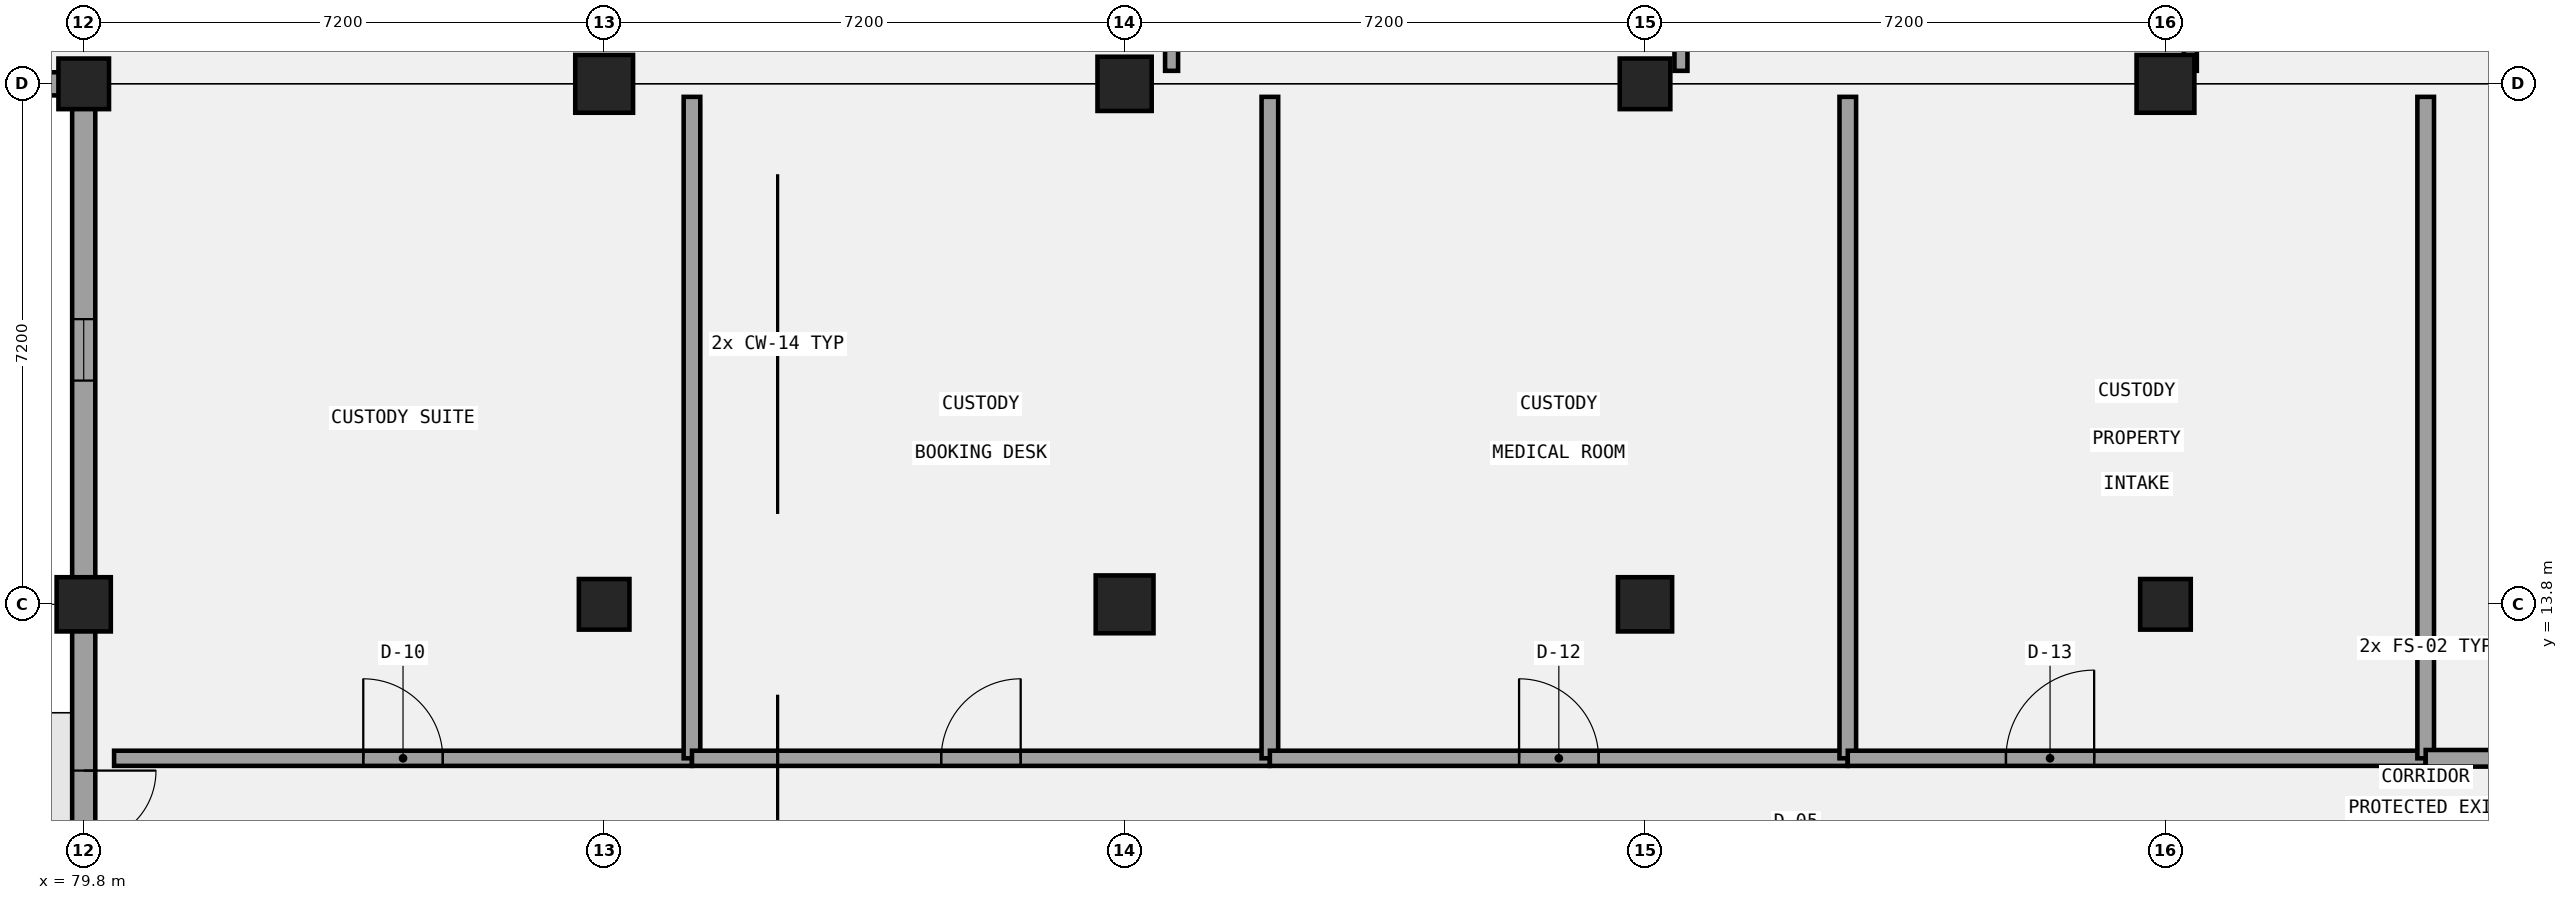
"""IFC4 building model, lengths in metres.
Left out: names, types, materials, properties, quantities, classifications, styles, units other than length and angle.
Written with IfcOpenShell. Run it as: python <this file> out.ifc"""

import sys

from ifc_helpers import new_model, si_unit, direction, frame, frame_2d, origin, origin_2d, place, context, subcontext, project, spatial, rectangle, extrude, element, fill, save


model = new_model("IFC4")
c1 = context("Model", 3, precision=1e-05, world=origin(), true_north=direction((0.0, 1.0)))
c2 = subcontext(c1, "Body", "Model", "MODEL_VIEW")
j1 = project(units=[si_unit("LENGTHUNIT", "METRE"), si_unit("PLANEANGLEUNIT", "RADIAN")], contexts=[c1])
p1 = place(None, origin())
s1 = spatial("IfcSite", under=j1, at=p1, CompositionType="ELEMENT")
p2 = place(p1, origin())
s2 = spatial("IfcBuilding", under=s1, at=p2, CompositionType="ELEMENT")
p3 = place(p2, origin())
s3 = spatial("IfcBuildingStorey", under=s2, at=p3, CompositionType="ELEMENT", Elevation=0.0)
p4 = place(p3, frame((79.8, 13.8, -0.32), z_axis=(0.0, 0.0, 1.0), x_axis=(1.0, 0.0, 0.0)))
e1 = element("IfcColumn", 1, at=p4, inside=s3, PredefinedType="COLUMN", context=c2, shape_type="SweptSolid", body=[
    extrude(rectangle(XDim=0.75, YDim=0.75, at=origin_2d()), origin(), (0.0, 0.0, 1.0), 5.72),
])
p5 = place(p3, frame((79.8, 21.0, 0.0), z_axis=(0.0, 0.0, 1.0), x_axis=(1.0, 0.0, 0.0)))
e2 = element("IfcColumn", 2, at=p5, inside=s3, PredefinedType="COLUMN", context=c2, shape_type="SweptSolid", body=[
    extrude(rectangle(XDim=0.7, YDim=0.7, at=origin_2d()), origin(), (0.0, 0.0, 1.0), 5.4),
])
p6 = place(p3, frame((87.0, 13.8, -0.32), z_axis=(0.0, 0.0, 1.0), x_axis=(1.0, 0.0, 0.0)))
e3 = element("IfcColumn", 3, at=p6, inside=s3, PredefinedType="COLUMN", context=c2, shape_type="SweptSolid", body=[
    extrude(rectangle(XDim=0.7, YDim=0.7, at=origin_2d()), origin(), (0.0, 0.0, 1.0), 5.72),
])
p7 = place(p3, frame((87.0, 21.0, 0.0), z_axis=(0.0, 0.0, 1.0), x_axis=(1.0, 0.0, 0.0)))
e4 = element("IfcColumn", 4, at=p7, inside=s3, PredefinedType="COLUMN", context=c2, shape_type="SweptSolid", body=[
    extrude(rectangle(XDim=0.8, YDim=0.8, at=origin_2d()), origin(), (0.0, 0.0, 1.0), 5.4),
])
p8 = place(p3, frame((94.2, 13.8, -0.32), z_axis=(0.0, 0.0, 1.0), x_axis=(1.0, 0.0, 0.0)))
e5 = element("IfcColumn", 5, at=p8, inside=s3, PredefinedType="COLUMN", context=c2, shape_type="SweptSolid", body=[
    extrude(rectangle(XDim=0.8, YDim=0.8, at=origin_2d()), origin(), (0.0, 0.0, 1.0), 5.72),
])
p9 = place(p3, frame((94.2, 21.0, 0.0), z_axis=(0.0, 0.0, 1.0), x_axis=(1.0, 0.0, 0.0)))
e6 = element("IfcColumn", 6, at=p9, inside=s3, PredefinedType="COLUMN", context=c2, shape_type="SweptSolid", body=[
    extrude(rectangle(XDim=0.75, YDim=0.75, at=origin_2d()), origin(), (0.0, 0.0, 1.0), 5.4),
])
p10 = place(p3, frame((101.4, 13.8, -0.32), z_axis=(0.0, 0.0, 1.0), x_axis=(1.0, 0.0, 0.0)))
e7 = element("IfcColumn", 7, at=p10, inside=s3, PredefinedType="COLUMN", context=c2, shape_type="SweptSolid", body=[
    extrude(rectangle(XDim=0.75, YDim=0.75, at=origin_2d()), origin(), (0.0, 0.0, 1.0), 5.72),
])
p11 = place(p3, frame((101.4, 21.0, 0.0), z_axis=(0.0, 0.0, 1.0), x_axis=(1.0, 0.0, 0.0)))
e8 = element("IfcColumn", 8, at=p11, inside=s3, PredefinedType="COLUMN", context=c2, shape_type="SweptSolid", body=[
    extrude(rectangle(XDim=0.7, YDim=0.7, at=origin_2d()), origin(), (0.0, 0.0, 1.0), 5.4),
])
p12 = place(p3, frame((108.6, 13.8, -0.32), z_axis=(0.0, 0.0, 1.0), x_axis=(1.0, 0.0, 0.0)))
e9 = element("IfcColumn", 9, at=p12, inside=s3, PredefinedType="COLUMN", context=c2, shape_type="SweptSolid", body=[
    extrude(rectangle(XDim=0.7, YDim=0.7, at=origin_2d()), origin(), (0.0, 0.0, 1.0), 5.72),
])
p13 = place(p3, frame((108.6, 21.0, 0.0), z_axis=(0.0, 0.0, 1.0), x_axis=(1.0, 0.0, 0.0)))
e10 = element("IfcColumn", 10, at=p13, inside=s3, PredefinedType="COLUMN", context=c2, shape_type="SweptSolid", body=[
    extrude(rectangle(XDim=0.8, YDim=0.8, at=origin_2d()), origin(), (0.0, 0.0, 1.0), 5.4),
])
p14 = place(p3, frame((79.8, 20.84, 0.0), z_axis=(0.0, 0.0, 1.0), x_axis=(0.0, -1.0, 0.0)))
e11 = element("IfcWall", 11, at=p14, inside=s3, PredefinedType="SOLIDWALL", context=c2, shape_type="SweptSolid", body=[
    extrude(rectangle(XDim=20.68, YDim=0.32, at=frame_2d((10.34, 0.0))), origin(), (0.0, 0.0, 1.0), 4.12),
])
p15 = place(p14, frame((9.34, 0.0, 0.0)))
e12 = element("IfcOpeningElement", 12, at=p15, cuts=e11, PredefinedType="OPENING", context=c2, shape_type="SweptSolid", body=[
    extrude(rectangle(XDim=2.0, YDim=2.6, at=frame_2d((1.0, 1.3))), frame((0.0, 0.17, 0.0), z_axis=(0.0, -1.0, 0.0), x_axis=(1.0, 0.0, 0.0)), (0.0, 0.0, 1.0), 0.34),
])
p16 = place(p14, frame((17.035, 0.0, 1.0)))
e13 = element("IfcOpeningElement", 13, at=p16, cuts=e11, PredefinedType="OPENING", context=c2, shape_type="SweptSolid", body=[
    extrude(rectangle(XDim=0.85, YDim=1.4, at=frame_2d((0.425, 0.7))), frame((0.0, 0.17, 0.0), z_axis=(0.0, -1.0, 0.0), x_axis=(1.0, 0.0, 0.0)), (0.0, 0.0, 1.0), 0.34),
])
p17 = place(p14, frame((3.095, 0.0, 1.0)))
e14 = element("IfcOpeningElement", 14, at=p17, cuts=e11, PredefinedType="OPENING", context=c2, shape_type="SweptSolid", body=[
    extrude(rectangle(XDim=0.85, YDim=1.4, at=frame_2d((0.425, 0.7))), frame((0.0, 0.17, 0.0), z_axis=(0.0, -1.0, 0.0), x_axis=(1.0, 0.0, 0.0)), (0.0, 0.0, 1.0), 0.34),
])
p18 = place(p3, frame((29.24, 21.0, 0.0), z_axis=(0.0, 0.0, 1.0), x_axis=(1.0, 0.0, 0.0)))
e15 = element("IfcWall", 15, at=p18, inside=s3, PredefinedType="SOLIDWALL", context=c2, shape_type="SweptSolid", body=[
    extrude(rectangle(XDim=50.72, YDim=0.32, at=frame_2d((25.36, 0.0))), origin(), (0.0, 0.0, 1.0), 3.35),
])
p19 = place(p18, frame((24.36, 0.0, 0.0)))
e16 = element("IfcOpeningElement", 16, at=p19, cuts=e15, PredefinedType="OPENING", context=c2, shape_type="SweptSolid", body=[
    extrude(rectangle(XDim=2.0, YDim=2.6, at=frame_2d((1.0, 1.3))), frame((0.0, 0.17, 0.0), z_axis=(0.0, -1.0, 0.0), x_axis=(1.0, 0.0, 0.0)), (0.0, 0.0, 1.0), 0.34),
])
p20 = place(p18, frame((3.035, 0.0, 1.0)))
e17 = element("IfcOpeningElement", 17, at=p20, cuts=e15, PredefinedType="OPENING", context=c2, shape_type="SweptSolid", body=[
    extrude(rectangle(XDim=1.45, YDim=1.65, at=frame_2d((0.725, 0.825))), frame((0.0, 0.17, 0.0), z_axis=(0.0, -1.0, 0.0), x_axis=(1.0, 0.0, 0.0)), (0.0, 0.0, 1.0), 0.34),
])
p21 = place(p18, frame((10.235, 0.0, 1.0)))
e18 = element("IfcOpeningElement", 18, at=p21, cuts=e15, PredefinedType="OPENING", context=c2, shape_type="SweptSolid", body=[
    extrude(rectangle(XDim=1.45, YDim=1.65, at=frame_2d((0.725, 0.825))), frame((0.0, 0.17, 0.0), z_axis=(0.0, -1.0, 0.0), x_axis=(1.0, 0.0, 0.0)), (0.0, 0.0, 1.0), 0.34),
])
p22 = place(p18, frame((17.435, 0.0, 1.0)))
e19 = element("IfcOpeningElement", 19, at=p22, cuts=e15, PredefinedType="OPENING", context=c2, shape_type="SweptSolid", body=[
    extrude(rectangle(XDim=1.45, YDim=1.65, at=frame_2d((0.725, 0.825))), frame((0.0, 0.17, 0.0), z_axis=(0.0, -1.0, 0.0), x_axis=(1.0, 0.0, 0.0)), (0.0, 0.0, 1.0), 0.34),
])
p23 = place(p18, frame((31.835, 0.0, 1.0)))
e20 = element("IfcOpeningElement", 20, at=p23, cuts=e15, PredefinedType="OPENING", context=c2, shape_type="SweptSolid", body=[
    extrude(rectangle(XDim=1.45, YDim=1.65, at=frame_2d((0.725, 0.825))), frame((0.0, 0.17, 0.0), z_axis=(0.0, -1.0, 0.0), x_axis=(1.0, 0.0, 0.0)), (0.0, 0.0, 1.0), 0.34),
])
p24 = place(p18, frame((39.035, 0.0, 1.0)))
e21 = element("IfcOpeningElement", 21, at=p24, cuts=e15, PredefinedType="OPENING", context=c2, shape_type="SweptSolid", body=[
    extrude(rectangle(XDim=1.45, YDim=1.65, at=frame_2d((0.725, 0.825))), frame((0.0, 0.17, 0.0), z_axis=(0.0, -1.0, 0.0), x_axis=(1.0, 0.0, 0.0)), (0.0, 0.0, 1.0), 0.34),
])
p25 = place(p18, frame((46.235, 0.0, 1.0)))
e22 = element("IfcOpeningElement", 22, at=p25, cuts=e15, PredefinedType="OPENING", context=c2, shape_type="SweptSolid", body=[
    extrude(rectangle(XDim=1.45, YDim=1.65, at=frame_2d((0.725, 0.825))), frame((0.0, 0.17, 0.0), z_axis=(0.0, -1.0, 0.0), x_axis=(1.0, 0.0, 0.0)), (0.0, 0.0, 1.0), 0.34),
])
for number, where, z_axis, x_axis in (
    (23, (94.85, 21.18, 0.0), (0.0, 0.0, 1.0), (0.0, 1.0, 0.0)),
    (24, (101.897, 21.18, 0.0), (0.0, 0.0, 1.0), (0.0, 1.0, 0.0)),
):
    element("IfcWall", number, at=place(p3, frame(where, z_axis=z_axis, x_axis=x_axis)), inside=s3, PredefinedType="PARTITIONING", context=c2, shape_type="SweptSolid", body=[
        extrude(rectangle(XDim=7.97, YDim=0.18, at=frame_2d((3.985, 0.0))), origin(), (0.0, 0.0, 1.0), 5.12),
    ])
p26 = place(p3, frame((108.944, 21.18, 0.0), z_axis=(0.0, 0.0, 1.0), x_axis=(0.0, 1.0, 0.0)))
e25 = element("IfcWall", 25, at=p26, inside=s3, PredefinedType="PARTITIONING", context=c2, shape_type="SweptSolid", body=[
    extrude(rectangle(XDim=7.97, YDim=0.18, at=frame_2d((3.985, 0.0))), origin(), (0.0, 0.0, 1.0), 4.27),
])
p27 = place(p3, frame((80.22, 11.67, 0.0), z_axis=(0.0, 0.0, 1.0), x_axis=(1.0, 0.0, 0.0)))
e26 = element("IfcWall", 26, at=p27, inside=s3, PredefinedType="PARTITIONING", context=c2, shape_type="SweptSolid", body=[
    extrude(rectangle(XDim=7.995, YDim=0.21, at=frame_2d((3.998, 0.0))), origin(), (0.0, 0.0, 1.0), 5.12),
])
p28 = place(p27, frame((3.448, 0.0, 0.0)))
e27 = element("IfcOpeningElement", 27, at=p28, cuts=e26, PredefinedType="OPENING", context=c2, shape_type="SweptSolid", body=[
    extrude(rectangle(XDim=1.1, YDim=2.1, at=frame_2d((0.55, 1.05))), frame((0.0, 0.115, 0.0), z_axis=(0.0, -1.0, 0.0), x_axis=(1.0, 0.0, 0.0)), (0.0, 0.0, 1.0), 0.23),
])
p29 = place(p3, frame((88.215, 11.67, 0.0), z_axis=(0.0, 0.0, 1.0), x_axis=(0.0, 1.0, 0.0)))
e28 = element("IfcWall", 28, at=p29, inside=s3, PredefinedType="PARTITIONING", context=c2, shape_type="SweptSolid", body=[
    extrude(rectangle(XDim=9.15, YDim=0.23, at=frame_2d((4.575, 0.0))), origin(), (0.0, 0.0, 1.0), 5.12),
])
p30 = place(p3, frame((88.215, 11.67, 0.0), z_axis=(0.0, 0.0, 1.0), x_axis=(1.0, 0.0, 0.0)))
e29 = element("IfcWall", 29, at=p30, inside=s3, PredefinedType="PARTITIONING", context=c2, shape_type="SweptSolid", body=[
    extrude(rectangle(XDim=7.995, YDim=0.21, at=frame_2d((3.998, 0.0))), origin(), (0.0, 0.0, 1.0), 5.12),
])
p31 = place(p30, frame((3.448, 0.0, 0.0)))
e30 = element("IfcOpeningElement", 30, at=p31, cuts=e29, PredefinedType="OPENING", context=c2, shape_type="SweptSolid", body=[
    extrude(rectangle(XDim=1.1, YDim=2.22, at=frame_2d((0.55, 1.11))), frame((0.0, 0.115, 0.0), z_axis=(0.0, -1.0, 0.0), x_axis=(1.0, 0.0, 0.0)), (0.0, 0.0, 1.0), 0.23),
])
p32 = place(p3, frame((96.21, 11.67, 0.0), z_axis=(0.0, 0.0, 1.0), x_axis=(0.0, 1.0, 0.0)))
e31 = element("IfcWall", 31, at=p32, inside=s3, PredefinedType="PARTITIONING", context=c2, shape_type="SweptSolid", body=[
    extrude(rectangle(XDim=9.15, YDim=0.23, at=frame_2d((4.575, 0.0))), origin(), (0.0, 0.0, 1.0), 5.12),
])
p33 = place(p3, frame((96.21, 11.67, 0.0), z_axis=(0.0, 0.0, 1.0), x_axis=(1.0, 0.0, 0.0)))
e32 = element("IfcWall", 32, at=p33, inside=s3, PredefinedType="PARTITIONING", context=c2, shape_type="SweptSolid", body=[
    extrude(rectangle(XDim=7.995, YDim=0.21, at=frame_2d((3.998, 0.0))), origin(), (0.0, 0.0, 1.0), 5.12),
])
p34 = place(p33, frame((3.448, 0.0, 0.0)))
e33 = element("IfcOpeningElement", 33, at=p34, cuts=e32, PredefinedType="OPENING", context=c2, shape_type="SweptSolid", body=[
    extrude(rectangle(XDim=1.1, YDim=2.35, at=frame_2d((0.55, 1.175))), frame((0.0, 0.115, 0.0), z_axis=(0.0, -1.0, 0.0), x_axis=(1.0, 0.0, 0.0)), (0.0, 0.0, 1.0), 0.23),
])
p35 = place(p3, frame((104.205, 11.67, 0.0), z_axis=(0.0, 0.0, 1.0), x_axis=(0.0, 1.0, 0.0)))
e34 = element("IfcWall", 34, at=p35, inside=s3, PredefinedType="PARTITIONING", context=c2, shape_type="SweptSolid", body=[
    extrude(rectangle(XDim=9.15, YDim=0.23, at=frame_2d((4.575, 0.0))), origin(), (0.0, 0.0, 1.0), 5.12),
])
p36 = place(p3, frame((104.205, 11.67, 0.0), z_axis=(0.0, 0.0, 1.0), x_axis=(1.0, 0.0, 0.0)))
e35 = element("IfcWall", 35, at=p36, inside=s3, PredefinedType="PARTITIONING", context=c2, shape_type="SweptSolid", body=[
    extrude(rectangle(XDim=7.995, YDim=0.21, at=frame_2d((3.998, 0.0))), origin(), (0.0, 0.0, 1.0), 5.12),
])
p37 = place(p36, frame((2.188, 0.0, 0.0)))
e36 = element("IfcOpeningElement", 36, at=p37, cuts=e35, PredefinedType="OPENING", context=c2, shape_type="SweptSolid", body=[
    extrude(rectangle(XDim=1.22, YDim=2.1, at=frame_2d((0.61, 1.05))), frame((0.0, 0.115, 0.0), z_axis=(0.0, -1.0, 0.0), x_axis=(1.0, 0.0, 0.0)), (0.0, 0.0, 1.0), 0.23),
])
p38 = place(p3, frame((112.2, 11.67, 0.0), z_axis=(0.0, 0.0, 1.0), x_axis=(0.0, 1.0, 0.0)))
e37 = element("IfcWall", 37, at=p38, inside=s3, PredefinedType="PARTITIONING", context=c2, shape_type="SweptSolid", body=[
    extrude(rectangle(XDim=9.15, YDim=0.23, at=frame_2d((4.575, 0.0))), origin(), (0.0, 0.0, 1.0), 5.12),
])
p39 = place(p3, frame((112.2, 11.67, 0.0), z_axis=(0.0, 0.0, 1.0), x_axis=(1.0, 0.0, 0.0)))
e38 = element("IfcWall", 38, at=p39, inside=s3, PredefinedType="PARTITIONING", context=c2, shape_type="SweptSolid", body=[
    extrude(rectangle(XDim=7.995, YDim=0.23, at=frame_2d((3.998, 0.0))), origin(), (0.0, 0.0, 1.0), 5.12),
])
p40 = place(p39, frame((4.587, 0.0, 0.0)))
e39 = element("IfcOpeningElement", 39, at=p40, cuts=e38, PredefinedType="OPENING", context=c2, shape_type="SweptSolid", body=[
    extrude(rectangle(XDim=1.22, YDim=2.22, at=frame_2d((0.61, 1.11))), frame((0.0, 0.125, 0.0), z_axis=(0.0, -1.0, 0.0), x_axis=(1.0, 0.0, 0.0)), (0.0, 0.0, 1.0), 0.25),
])
p41 = place(p15, frame((2.0, 0.0, 0.0), z_axis=(0.0, 0.0, 1.0), x_axis=(-1.0, 0.0, 0.0)))
e40 = element("IfcDoor", 40, at=p41, inside=s3, OperationType="DOUBLE_DOOR_SINGLE_SWING", PredefinedType="DOOR", context=c2, shape_type="SweptSolid", body=[
    extrude(rectangle(XDim=2.0, YDim=2.6, at=frame_2d((1.0, 1.3))), frame((0.0, 0.025, 0.0), z_axis=(0.0, -1.0, 0.0), x_axis=(1.0, 0.0, 0.0)), (0.0, 0.0, 1.0), 0.05),
])
fill(e12, e40)
p42 = place(p17, origin())
e41 = element("IfcWindow", 41, at=p42, inside=s3, PartitioningType="SINGLE_PANEL", PredefinedType="WINDOW", context=c2, shape_type="SweptSolid", body=[
    extrude(rectangle(XDim=0.85, YDim=1.4, at=frame_2d((0.425, 0.7))), frame((0.0, 0.03, 0.0), z_axis=(0.0, -1.0, 0.0), x_axis=(1.0, 0.0, 0.0)), (0.0, 0.0, 1.0), 0.06),
])
fill(e14, e41)
p43 = place(p28, origin())
e42 = element("IfcDoor", 42, at=p43, inside=s3, OperationType="SINGLE_SWING_LEFT", PredefinedType="DOOR", context=c2, shape_type="SweptSolid", body=[
    extrude(rectangle(XDim=1.1, YDim=2.1, at=frame_2d((0.55, 1.05))), frame((0.0, 0.025, 0.0), z_axis=(0.0, -1.0, 0.0), x_axis=(1.0, 0.0, 0.0)), (0.0, 0.0, 1.0), 0.05),
])
fill(e27, e42)
p44 = place(p31, origin())
e43 = element("IfcDoor", 43, at=p44, inside=s3, OperationType="SINGLE_SWING_RIGHT", PredefinedType="DOOR", context=c2, shape_type="SweptSolid", body=[
    extrude(rectangle(XDim=1.1, YDim=2.22, at=frame_2d((0.55, 1.11))), frame((0.0, 0.025, 0.0), z_axis=(0.0, -1.0, 0.0), x_axis=(1.0, 0.0, 0.0)), (0.0, 0.0, 1.0), 0.05),
])
fill(e30, e43)
p45 = place(p34, origin())
e44 = element("IfcDoor", 44, at=p45, inside=s3, OperationType="SINGLE_SWING_LEFT", PredefinedType="DOOR", context=c2, shape_type="SweptSolid", body=[
    extrude(rectangle(XDim=1.1, YDim=2.35, at=frame_2d((0.55, 1.175))), frame((0.0, 0.025, 0.0), z_axis=(0.0, -1.0, 0.0), x_axis=(1.0, 0.0, 0.0)), (0.0, 0.0, 1.0), 0.05),
])
fill(e33, e44)
p46 = place(p37, origin())
e45 = element("IfcDoor", 45, at=p46, inside=s3, OperationType="SINGLE_SWING_RIGHT", PredefinedType="DOOR", context=c2, shape_type="SweptSolid", body=[
    extrude(rectangle(XDim=1.22, YDim=2.1, at=frame_2d((0.61, 1.05))), frame((0.0, 0.025, 0.0), z_axis=(0.0, -1.0, 0.0), x_axis=(1.0, 0.0, 0.0)), (0.0, 0.0, 1.0), 0.05),
])
fill(e36, e45)
save(model, sys.argv[1])
